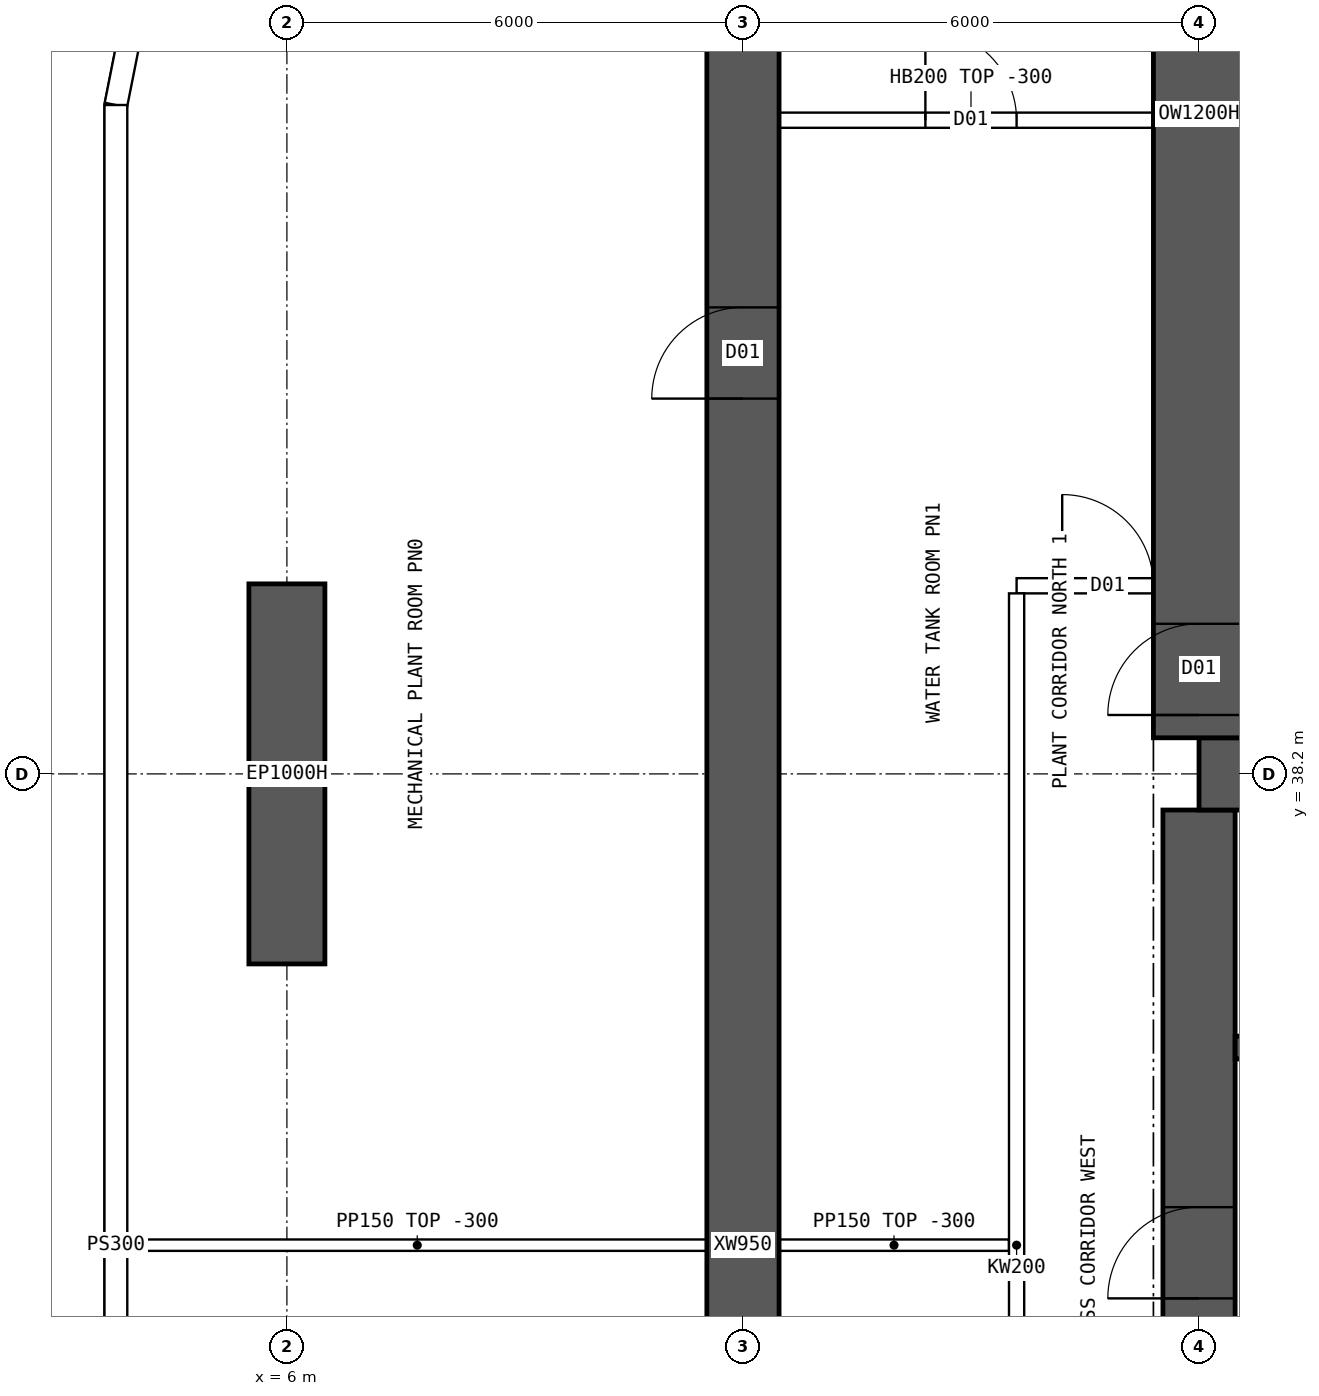
"""IFC4 building model, lengths in metres.
Left out: names, types, materials, properties, quantities, classifications, styles, units other than length and angle.
Written with IfcOpenShell. Run it as: python <this file> out.ifc"""

import sys

from ifc_helpers import new_model, si_unit, direction, frame, frame_2d, origin, place, context, subcontext, project, spatial, polyline, rectangle, outline, extrude, element, fill, save


model = new_model("IFC4")
c1 = context("Model", 3, precision=1e-05, world=origin(), true_north=direction((0.0, 1.0)))
c2 = subcontext(c1, "Body", "Model", "MODEL_VIEW")
j1 = project(units=[si_unit("LENGTHUNIT", "METRE"), si_unit("PLANEANGLEUNIT", "RADIAN")], contexts=[c1])
p1 = place(None, origin())
s1 = spatial("IfcSite", under=j1, at=p1, CompositionType="ELEMENT")
p2 = place(p1, origin())
s2 = spatial("IfcBuilding", under=s1, at=p2, CompositionType="ELEMENT")
p3 = place(p2, frame((0.0, 0.0, 133.15)))
s3 = spatial("IfcBuildingStorey", under=s2, at=p3, CompositionType="ELEMENT", Elevation=133.15)
p4 = place(p3, frame((6.0, 35.7, 0.0), z_axis=(0.0, 0.0, 1.0), x_axis=(0.0, 1.0, 0.0)))
e1 = element("IfcWall", 1, at=p4, inside=s3, PredefinedType="SHEAR", context=c2, shape_type="SweptSolid", body=[
    extrude(rectangle(XDim=5.0, YDim=1.0, at=frame_2d((2.5, 0.0))), origin(), (0.0, 0.0, 1.0), 7.2),
])
p5 = place(p3, frame((18.0, 38.2, 0.0), z_axis=(0.0, 0.0, 1.0), x_axis=(1.0, 0.0, 0.0)))
e2 = element("IfcWall", 2, at=p5, inside=s3, PredefinedType="SHEAR", context=c2, shape_type="SweptSolid", body=[
    extrude(rectangle(XDim=48.0, YDim=0.95, at=frame_2d((24.0, 0.0))), origin(), (0.0, 0.0, 1.0), 7.2),
])
p6 = place(p3, frame((18.0, 26.275, 0.0), z_axis=(0.0, 0.0, 1.0), x_axis=(0.0, 1.0, 0.0)))
e3 = element("IfcWall", 3, at=p6, inside=s3, PredefinedType="SHEAR", context=c2, shape_type="SweptSolid", body=[
    extrude(rectangle(XDim=11.45, YDim=0.95, at=frame_2d((5.725, 0.0))), origin(), (0.0, 0.0, 1.0), 7.2),
])
p7 = place(p6, frame((5.025, 0.0, 0.0)))
e4 = element("IfcOpeningElement", 4, at=p7, cuts=e3, PredefinedType="OPENING", context=c2, shape_type="SweptSolid", body=[
    extrude(rectangle(XDim=1.2, YDim=2.1, at=frame_2d((0.6, 1.05))), frame((0.0, 0.485, 0.0), z_axis=(0.0, -1.0, 0.0), x_axis=(1.0, 0.0, 0.0)), (0.0, 0.0, 1.0), 0.97),
])
p8 = place(p3, frame((18.475, 34.6, 0.0), z_axis=(0.0, 0.0, 1.0), x_axis=(1.0, 0.0, 0.0)))
e5 = element("IfcWall", 5, at=p8, inside=s3, PredefinedType="SHEAR", context=c2, shape_type="SweptSolid", body=[
    extrude(rectangle(XDim=47.05, YDim=0.3, at=frame_2d((23.525, 0.0))), origin(), (0.0, 0.0, 1.0), 7.2),
])
p9 = place(p8, frame((0.9, 0.0, 0.0)))
e6 = element("IfcOpeningElement", 6, at=p9, cuts=e5, PredefinedType="OPENING", context=c2, shape_type="SweptSolid", body=[
    extrude(rectangle(XDim=1.1, YDim=2.1, at=frame_2d((0.55, 1.05))), frame((0.0, 0.16, 0.0), z_axis=(0.0, -1.0, 0.0), x_axis=(1.0, 0.0, 0.0)), (0.0, 0.0, 1.0), 0.32),
])
p10 = place(p8, frame((45.05, 0.0, 0.0)))
e7 = element("IfcOpeningElement", 7, at=p10, cuts=e5, PredefinedType="OPENING", context=c2, shape_type="SweptSolid", body=[
    extrude(rectangle(XDim=1.1, YDim=2.1, at=frame_2d((0.55, 1.05))), frame((0.0, 0.16, 0.0), z_axis=(0.0, -1.0, 0.0), x_axis=(1.0, 0.0, 0.0)), (0.0, 0.0, 1.0), 0.32),
])
p11 = place(p8, frame((4.125, 0.0, 0.0)))
e8 = element("IfcOpeningElement", 8, at=p11, cuts=e5, PredefinedType="OPENING", context=c2, shape_type="SweptSolid", body=[
    extrude(rectangle(XDim=0.9, YDim=2.1, at=frame_2d((0.45, 1.05))), frame((0.0, 0.16, 0.0), z_axis=(0.0, -1.0, 0.0), x_axis=(1.0, 0.0, 0.0)), (0.0, 0.0, 1.0), 0.32),
])
p12 = place(p8, frame((42.025, 0.0, 0.0)))
e9 = element("IfcOpeningElement", 9, at=p12, cuts=e5, PredefinedType="OPENING", context=c2, shape_type="SweptSolid", body=[
    extrude(rectangle(XDim=0.9, YDim=2.1, at=frame_2d((0.45, 1.05))), frame((0.0, 0.16, 0.0), z_axis=(0.0, -1.0, 0.0), x_axis=(1.0, 0.0, 0.0)), (0.0, 0.0, 1.0), 0.32),
])
p13 = place(p8, frame((8.9, 0.0, 0.0)))
e10 = element("IfcOpeningElement", 10, at=p13, cuts=e5, PredefinedType="OPENING", context=c2, shape_type="SweptSolid", body=[
    extrude(rectangle(XDim=0.9, YDim=2.1, at=frame_2d((0.45, 1.05))), frame((0.0, 0.16, 0.0), z_axis=(0.0, -1.0, 0.0), x_axis=(1.0, 0.0, 0.0)), (0.0, 0.0, 1.0), 0.32),
])
p14 = place(p8, frame((12.874, 0.0, 0.0)))
e11 = element("IfcOpeningElement", 11, at=p14, cuts=e5, PredefinedType="OPENING", context=c2, shape_type="SweptSolid", body=[
    extrude(rectangle(XDim=0.9, YDim=2.1, at=frame_2d((0.45, 1.05))), frame((0.0, 0.16, 0.0), z_axis=(0.0, -1.0, 0.0), x_axis=(1.0, 0.0, 0.0)), (0.0, 0.0, 1.0), 0.32),
])
p15 = place(p8, frame((16.521, 0.0, 0.0)))
e12 = element("IfcOpeningElement", 12, at=p15, cuts=e5, PredefinedType="OPENING", context=c2, shape_type="SweptSolid", body=[
    extrude(rectangle(XDim=0.9, YDim=2.1, at=frame_2d((0.45, 1.05))), frame((0.0, 0.16, 0.0), z_axis=(0.0, -1.0, 0.0), x_axis=(1.0, 0.0, 0.0)), (0.0, 0.0, 1.0), 0.32),
])
p16 = place(p8, frame((20.28, 0.0, 0.0)))
e13 = element("IfcOpeningElement", 13, at=p16, cuts=e5, PredefinedType="OPENING", context=c2, shape_type="SweptSolid", body=[
    extrude(rectangle(XDim=0.9, YDim=2.1, at=frame_2d((0.45, 1.05))), frame((0.0, 0.16, 0.0), z_axis=(0.0, -1.0, 0.0), x_axis=(1.0, 0.0, 0.0)), (0.0, 0.0, 1.0), 0.32),
])
p17 = place(p8, frame((24.686, 0.0, 0.0)))
e14 = element("IfcOpeningElement", 14, at=p17, cuts=e5, PredefinedType="OPENING", context=c2, shape_type="SweptSolid", body=[
    extrude(rectangle(XDim=0.9, YDim=2.1, at=frame_2d((0.45, 1.05))), frame((0.0, 0.16, 0.0), z_axis=(0.0, -1.0, 0.0), x_axis=(1.0, 0.0, 0.0)), (0.0, 0.0, 1.0), 0.32),
])
p18 = place(p8, frame((27.483, 0.0, 0.0)))
e15 = element("IfcOpeningElement", 15, at=p18, cuts=e5, PredefinedType="OPENING", context=c2, shape_type="SweptSolid", body=[
    extrude(rectangle(XDim=0.9, YDim=2.1, at=frame_2d((0.45, 1.05))), frame((0.0, 0.16, 0.0), z_axis=(0.0, -1.0, 0.0), x_axis=(1.0, 0.0, 0.0)), (0.0, 0.0, 1.0), 0.32),
])
p19 = place(p8, frame((33.604, 0.0, 0.0)))
e16 = element("IfcOpeningElement", 16, at=p19, cuts=e5, PredefinedType="OPENING", context=c2, shape_type="SweptSolid", body=[
    extrude(rectangle(XDim=0.9, YDim=2.1, at=frame_2d((0.45, 1.05))), frame((0.0, 0.16, 0.0), z_axis=(0.0, -1.0, 0.0), x_axis=(1.0, 0.0, 0.0)), (0.0, 0.0, 1.0), 0.32),
])
p20 = place(p3, frame((12.0, 8.9, 0.0), z_axis=(0.0, 0.0, 1.0), x_axis=(0.0, 1.0, 0.0)))
e17 = element("IfcWall", 17, at=p20, inside=s3, PredefinedType="SHEAR", context=c2, shape_type="SweptSolid", body=[
    extrude(rectangle(XDim=46.2, YDim=0.95, at=frame_2d((23.1, 0.0))), origin(), (0.0, 0.0, 1.0), 7.2),
])
p21 = place(p20, frame((3.85, 0.0, 0.0)))
e18 = element("IfcOpeningElement", 18, at=p21, cuts=e17, PredefinedType="OPENING", context=c2, shape_type="SweptSolid", body=[
    extrude(rectangle(XDim=1.2, YDim=2.1, at=frame_2d((0.6, 1.05))), frame((0.0, 0.485, 0.0), z_axis=(0.0, -1.0, 0.0), x_axis=(1.0, 0.0, 0.0)), (0.0, 0.0, 1.0), 0.97),
])
p22 = place(p20, frame((10.762, 0.0, 0.0)))
e19 = element("IfcOpeningElement", 19, at=p22, cuts=e17, PredefinedType="OPENING", context=c2, shape_type="SweptSolid", body=[
    extrude(rectangle(XDim=1.2, YDim=2.1, at=frame_2d((0.6, 1.05))), frame((0.0, 0.485, 0.0), z_axis=(0.0, -1.0, 0.0), x_axis=(1.0, 0.0, 0.0)), (0.0, 0.0, 1.0), 0.97),
])
p23 = place(p20, frame((41.15, 0.0, 0.0)))
e20 = element("IfcOpeningElement", 20, at=p23, cuts=e17, PredefinedType="OPENING", context=c2, shape_type="SweptSolid", body=[
    extrude(rectangle(XDim=1.2, YDim=2.1, at=frame_2d((0.6, 1.05))), frame((0.0, 0.485, 0.0), z_axis=(0.0, -1.0, 0.0), x_axis=(1.0, 0.0, 0.0)), (0.0, 0.0, 1.0), 0.97),
])
p24 = place(p20, frame((34.238, 0.0, 0.0)))
e21 = element("IfcOpeningElement", 21, at=p24, cuts=e17, PredefinedType="OPENING", context=c2, shape_type="SweptSolid", body=[
    extrude(rectangle(XDim=1.2, YDim=2.1, at=frame_2d((0.6, 1.05))), frame((0.0, 0.485, 0.0), z_axis=(0.0, -1.0, 0.0), x_axis=(1.0, 0.0, 0.0)), (0.0, 0.0, 1.0), 0.97),
])
p25 = place(p3, frame((18.0, 38.675, 0.0), z_axis=(0.0, 0.0, 1.0), x_axis=(0.0, 1.0, 0.0)))
e22 = element("IfcWall", 22, at=p25, inside=s3, PredefinedType="SHEAR", context=c2, shape_type="SweptSolid", body=[
    extrude(rectangle(XDim=16.425, YDim=1.2, at=frame_2d((8.212, 0.0))), origin(), (0.0, 0.0, 1.0), 7.2),
])
p26 = place(p25, frame((0.3, 0.0, 0.0)))
e23 = element("IfcOpeningElement", 23, at=p26, cuts=e22, PredefinedType="OPENING", context=c2, shape_type="SweptSolid", body=[
    extrude(rectangle(XDim=1.2, YDim=2.1, at=frame_2d((0.6, 1.05))), frame((0.0, 0.61, 0.0), z_axis=(0.0, -1.0, 0.0), x_axis=(1.0, 0.0, 0.0)), (0.0, 0.0, 1.0), 1.22),
])
p27 = place(p3, frame((3.75, 47.0, 0.0), z_axis=(0.0, 0.0, 1.0), x_axis=(0.0, -1.0, 0.0)))
e24 = element("IfcWall", 24, at=p27, inside=s3, PredefinedType="SOLIDWALL", context=c2, shape_type="SweptSolid", body=[
    extrude(outline(polyline([(-0.015, -0.15), (30.015, -0.15), (29.985, 0.15), (0.015, 0.15), (-0.015, -0.15)])), origin(), (0.0, 0.0, 1.0), 6.9),
])
p28 = place(p3, frame((4.378, 50.157, 0.0), z_axis=(0.0, 0.0, 1.0), x_axis=(-0.195080412259, -0.980787251524, 0.0)))
e25 = element("IfcWall", 25, at=p28, inside=s3, PredefinedType="SOLIDWALL", context=c2, shape_type="SweptSolid", body=[
    extrude(outline(polyline([(-0.03, -0.15), (3.234, -0.15), (3.204, 0.15), (0.03, 0.15), (-0.03, -0.15)])), origin(), (0.0, 0.0, 1.0), 6.9),
])
p29 = place(p3, frame((15.6, 40.675, 0.0), z_axis=(0.0, 0.0, 1.0), x_axis=(1.0, 0.0, 0.0)))
e26 = element("IfcWall", 26, at=p29, inside=s3, PredefinedType="SOLIDWALL", context=c2, shape_type="SweptSolid", body=[
    extrude(rectangle(XDim=52.8, YDim=0.2, at=frame_2d((26.4, 0.0))), origin(), (0.0, 0.0, 1.0), 6.9),
])
p30 = place(p29, frame((0.6, 0.0, 0.0)))
e27 = element("IfcOpeningElement", 27, at=p30, cuts=e26, PredefinedType="OPENING", context=c2, shape_type="SweptSolid", body=[
    extrude(rectangle(XDim=1.2, YDim=2.1, at=frame_2d((0.6, 1.05))), frame((0.0, 0.11, 0.0), z_axis=(0.0, -1.0, 0.0), x_axis=(1.0, 0.0, 0.0)), (0.0, 0.0, 1.0), 0.22),
])
p31 = place(p29, frame((3.475, 0.0, 0.0)))
e28 = element("IfcOpeningElement", 28, at=p31, cuts=e26, PredefinedType="OPENING", context=c2, shape_type="SweptSolid", body=[
    extrude(rectangle(XDim=1.8, YDim=2.4, at=frame_2d((0.9, 1.2))), frame((0.0, 0.11, 0.0), z_axis=(0.0, -1.0, 0.0), x_axis=(1.0, 0.0, 0.0)), (0.0, 0.0, 1.0), 0.22),
])
p32 = place(p29, frame((9.475, 0.0, 0.0)))
e29 = element("IfcOpeningElement", 29, at=p32, cuts=e26, PredefinedType="OPENING", context=c2, shape_type="SweptSolid", body=[
    extrude(rectangle(XDim=1.8, YDim=2.4, at=frame_2d((0.9, 1.2))), frame((0.0, 0.11, 0.0), z_axis=(0.0, -1.0, 0.0), x_axis=(1.0, 0.0, 0.0)), (0.0, 0.0, 1.0), 0.22),
])
p33 = place(p29, frame((15.475, 0.0, 0.0)))
e30 = element("IfcOpeningElement", 30, at=p33, cuts=e26, PredefinedType="OPENING", context=c2, shape_type="SweptSolid", body=[
    extrude(rectangle(XDim=1.8, YDim=2.4, at=frame_2d((0.9, 1.2))), frame((0.0, 0.11, 0.0), z_axis=(0.0, -1.0, 0.0), x_axis=(1.0, 0.0, 0.0)), (0.0, 0.0, 1.0), 0.22),
])
p34 = place(p29, frame((21.475, 0.0, 0.0)))
e31 = element("IfcOpeningElement", 31, at=p34, cuts=e26, PredefinedType="OPENING", context=c2, shape_type="SweptSolid", body=[
    extrude(rectangle(XDim=1.8, YDim=2.4, at=frame_2d((0.9, 1.2))), frame((0.0, 0.11, 0.0), z_axis=(0.0, -1.0, 0.0), x_axis=(1.0, 0.0, 0.0)), (0.0, 0.0, 1.0), 0.22),
])
p35 = place(p29, frame((27.475, 0.0, 0.0)))
e32 = element("IfcOpeningElement", 32, at=p35, cuts=e26, PredefinedType="OPENING", context=c2, shape_type="SweptSolid", body=[
    extrude(rectangle(XDim=1.8, YDim=2.4, at=frame_2d((0.9, 1.2))), frame((0.0, 0.11, 0.0), z_axis=(0.0, -1.0, 0.0), x_axis=(1.0, 0.0, 0.0)), (0.0, 0.0, 1.0), 0.22),
])
p36 = place(p29, frame((33.475, 0.0, 0.0)))
e33 = element("IfcOpeningElement", 33, at=p36, cuts=e26, PredefinedType="OPENING", context=c2, shape_type="SweptSolid", body=[
    extrude(rectangle(XDim=1.8, YDim=2.4, at=frame_2d((0.9, 1.2))), frame((0.0, 0.11, 0.0), z_axis=(0.0, -1.0, 0.0), x_axis=(1.0, 0.0, 0.0)), (0.0, 0.0, 1.0), 0.22),
])
p37 = place(p29, frame((39.475, 0.0, 0.0)))
e34 = element("IfcOpeningElement", 34, at=p37, cuts=e26, PredefinedType="OPENING", context=c2, shape_type="SweptSolid", body=[
    extrude(rectangle(XDim=1.8, YDim=2.4, at=frame_2d((0.9, 1.2))), frame((0.0, 0.11, 0.0), z_axis=(0.0, -1.0, 0.0), x_axis=(1.0, 0.0, 0.0)), (0.0, 0.0, 1.0), 0.22),
])
p38 = place(p29, frame((45.475, 0.0, 0.0)))
e35 = element("IfcOpeningElement", 35, at=p38, cuts=e26, PredefinedType="OPENING", context=c2, shape_type="SweptSolid", body=[
    extrude(rectangle(XDim=1.8, YDim=2.4, at=frame_2d((0.9, 1.2))), frame((0.0, 0.11, 0.0), z_axis=(0.0, -1.0, 0.0), x_axis=(1.0, 0.0, 0.0)), (0.0, 0.0, 1.0), 0.22),
])
p39 = place(p29, frame((51.475, 0.0, 0.0)))
e36 = element("IfcOpeningElement", 36, at=p39, cuts=e26, PredefinedType="OPENING", context=c2, shape_type="SweptSolid", body=[
    extrude(rectangle(XDim=1.2, YDim=2.1, at=frame_2d((0.6, 1.05))), frame((0.0, 0.11, 0.0), z_axis=(0.0, -1.0, 0.0), x_axis=(1.0, 0.0, 0.0)), (0.0, 0.0, 1.0), 0.22),
])
p40 = place(p3, frame((15.6, 23.425, 0.0), z_axis=(0.0, 0.0, 1.0), x_axis=(0.0, 1.0, 0.0)))
e37 = element("IfcWall", 37, at=p40, inside=s3, PredefinedType="SOLIDWALL", context=c2, shape_type="SweptSolid", body=[
    extrude(rectangle(XDim=17.15, YDim=0.2, at=frame_2d((8.575, 0.0))), origin(), (0.0, 0.0, 1.0), 6.9),
])
p41 = place(p3, frame((12.475, 46.8, 0.0), z_axis=(0.0, 0.0, 1.0), x_axis=(1.0, 0.0, 0.0)))
e38 = element("IfcWall", 38, at=p41, inside=s3, PredefinedType="SOLIDWALL", context=c2, shape_type="SweptSolid", body=[
    extrude(rectangle(XDim=5.05, YDim=0.2, at=frame_2d((2.525, 0.0))), origin(), (0.0, 0.0, 1.0), 6.9),
])
p42 = place(p41, frame((1.925, 0.0, 0.0)))
e39 = element("IfcOpeningElement", 39, at=p42, cuts=e38, PredefinedType="OPENING", context=c2, shape_type="SweptSolid", body=[
    extrude(rectangle(XDim=1.2, YDim=2.1, at=frame_2d((0.6, 1.05))), frame((0.0, 0.11, 0.0), z_axis=(0.0, -1.0, 0.0), x_axis=(1.0, 0.0, 0.0)), (0.0, 0.0, 1.0), 0.22),
])
p43 = place(p3, frame((18.475, 46.8, 0.0), z_axis=(0.0, 0.0, 1.0), x_axis=(1.0, 0.0, 0.0)))
e40 = element("IfcWall", 40, at=p43, inside=s3, PredefinedType="SOLIDWALL", context=c2, shape_type="SweptSolid", body=[
    extrude(rectangle(XDim=5.05, YDim=0.2, at=frame_2d((2.525, 0.0))), origin(), (0.0, 0.0, 1.0), 6.9),
])
p44 = place(p43, frame((1.925, 0.0, 0.0)))
e41 = element("IfcOpeningElement", 41, at=p44, cuts=e40, PredefinedType="OPENING", context=c2, shape_type="SweptSolid", body=[
    extrude(rectangle(XDim=1.2, YDim=2.1, at=frame_2d((0.6, 1.05))), frame((0.0, 0.11, 0.0), z_axis=(0.0, -1.0, 0.0), x_axis=(1.0, 0.0, 0.0)), (0.0, 0.0, 1.0), 0.22),
])
p45 = place(p3, frame((3.905, 32.0, 0.0), z_axis=(0.0, 0.0, 1.0), x_axis=(1.0, 0.0, 0.0)))
e42 = element("IfcWall", 42, at=p45, inside=s3, PredefinedType="PARTITIONING", context=c2, shape_type="SweptSolid", body=[
    extrude(rectangle(XDim=7.62, YDim=0.15, at=frame_2d((3.81, 0.0))), origin(), (0.0, 0.0, 1.0), 6.9),
])
p46 = place(p3, frame((12.475, 32.0, 0.0), z_axis=(0.0, 0.0, 1.0), x_axis=(1.0, 0.0, 0.0)))
e43 = element("IfcWall", 43, at=p46, inside=s3, PredefinedType="PARTITIONING", context=c2, shape_type="SweptSolid", body=[
    extrude(rectangle(XDim=3.025, YDim=0.15, at=frame_2d((1.512, 0.0))), origin(), (0.0, 0.0, 1.0), 6.9),
])
p47 = place(p7, origin())
e44 = element("IfcDoor", 44, at=p47, inside=s3, OperationType="SINGLE_SWING_LEFT", PredefinedType="DOOR", context=c2, shape_type="SweptSolid", body=[
    extrude(rectangle(XDim=1.2, YDim=2.1, at=frame_2d((0.6, 1.05))), frame((0.0, 0.025, 0.0), z_axis=(0.0, -1.0, 0.0), x_axis=(1.0, 0.0, 0.0)), (0.0, 0.0, 1.0), 0.05),
])
fill(e4, e44)
p48 = place(p42, origin())
e45 = element("IfcDoor", 45, at=p48, inside=s3, OperationType="SINGLE_SWING_LEFT", PredefinedType="DOOR", context=c2, shape_type="SweptSolid", body=[
    extrude(rectangle(XDim=1.2, YDim=2.1, at=frame_2d((0.6, 1.05))), frame((0.0, 0.025, 0.0), z_axis=(0.0, -1.0, 0.0), x_axis=(1.0, 0.0, 0.0)), (0.0, 0.0, 1.0), 0.05),
])
fill(e39, e45)
p49 = place(p30, origin())
e46 = element("IfcDoor", 46, at=p49, inside=s3, OperationType="SINGLE_SWING_LEFT", PredefinedType="DOOR", context=c2, shape_type="SweptSolid", body=[
    extrude(rectangle(XDim=1.2, YDim=2.1, at=frame_2d((0.6, 1.05))), frame((0.0, 0.025, 0.0), z_axis=(0.0, -1.0, 0.0), x_axis=(1.0, 0.0, 0.0)), (0.0, 0.0, 1.0), 0.05),
])
fill(e27, e46)
p50 = place(p26, origin())
e47 = element("IfcDoor", 47, at=p50, inside=s3, OperationType="SINGLE_SWING_LEFT", PredefinedType="DOOR", context=c2, shape_type="SweptSolid", body=[
    extrude(rectangle(XDim=1.2, YDim=2.1, at=frame_2d((0.6, 1.05))), frame((0.0, 0.025, 0.0), z_axis=(0.0, -1.0, 0.0), x_axis=(1.0, 0.0, 0.0)), (0.0, 0.0, 1.0), 0.05),
])
fill(e23, e47)
p51 = place(p24, origin())
e48 = element("IfcDoor", 48, at=p51, inside=s3, OperationType="SINGLE_SWING_LEFT", PredefinedType="DOOR", context=c2, shape_type="SweptSolid", body=[
    extrude(rectangle(XDim=1.2, YDim=2.1, at=frame_2d((0.6, 1.05))), frame((0.0, 0.46, 0.0), z_axis=(0.0, -1.0, 0.0), x_axis=(1.0, 0.0, 0.0)), (0.0, 0.0, 1.0), 0.05),
])
fill(e21, e48)
save(model, sys.argv[1])
